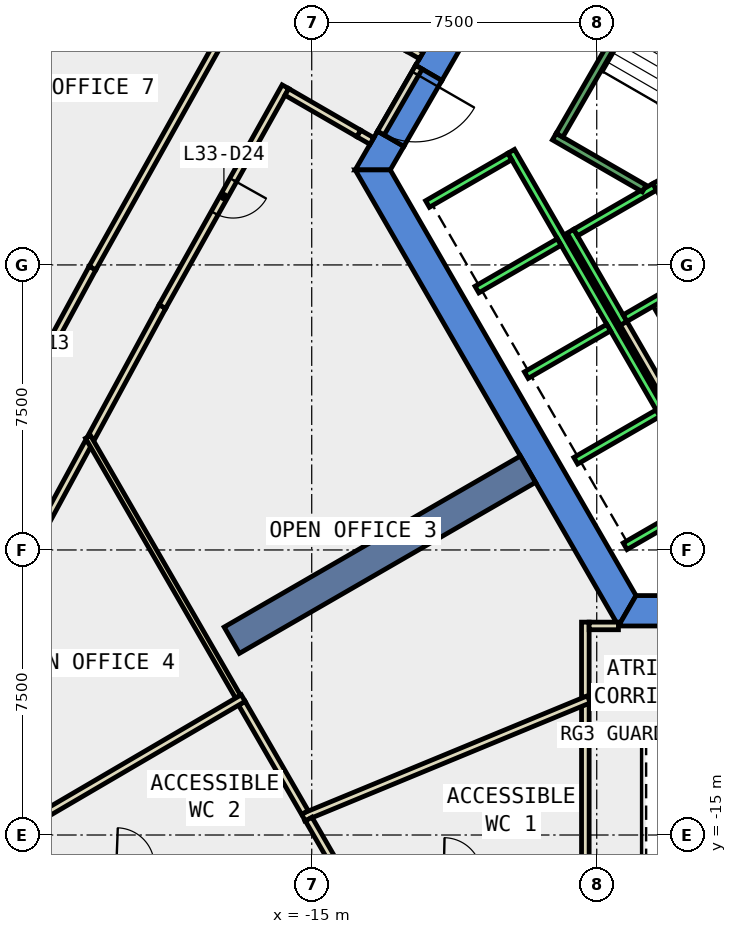
"""IFC4 building model, lengths in metres.
Left out: names, types, materials, properties, quantities, classifications, styles, units other than length and angle.
Written with IfcOpenShell. Run it as: python <this file> out.ifc"""

import sys

from ifc_helpers import new_model, si_unit, direction, frame, frame_2d, origin, place, context, subcontext, project, spatial, polyline, rectangle, outline, extrude, element, fill, save


model = new_model("IFC4")
c1 = context("Model", 3, precision=1e-05, world=origin(), true_north=direction((0.0, 1.0)))
c2 = subcontext(c1, "Body", "Model", "MODEL_VIEW")
j1 = project(units=[si_unit("LENGTHUNIT", "METRE"), si_unit("PLANEANGLEUNIT", "RADIAN")], contexts=[c1])
p1 = place(None, origin())
s1 = spatial("IfcSite", under=j1, at=p1, CompositionType="ELEMENT")
p2 = place(p1, origin())
s2 = spatial("IfcBuilding", under=s1, at=p2, CompositionType="ELEMENT")
p3 = place(p2, frame((0.0, 0.0, 150.8)))
s3 = spatial("IfcBuildingStorey", under=s2, at=p3, CompositionType="ELEMENT", Elevation=150.8)
p4 = place(p3, frame((0.0, 0.0, -0.4)))
e1 = element("IfcWall", 1, at=p4, inside=s3, PredefinedType="SHEAR", context=c2, shape_type="SweptSolid", body=[
    extrude(outline(polyline([(-12.267, 5.252), (-11.575, 4.852), (-6.466, 13.7), (-6.928, 14.5), (-12.267, 5.252)])), origin(), (0.0, 0.0, 1.0), 4.2),
])
p5 = place(p3, frame((0.0, 0.0, -0.4)))
e2 = element("IfcWall", 2, at=p5, inside=s3, PredefinedType="SHEAR", context=c2, shape_type="SweptSolid", body=[
    extrude(outline(polyline([(-12.575, 3.12), (-13.267, 3.52), (-13.856, 2.5), (-12.933, 2.5), (-12.575, 3.12)])), origin(), (0.0, 0.0, 1.0), 4.2),
])
p6 = place(p3, frame((0.0, 0.0, 3.6)))
e3 = element("IfcWall", 3, at=p6, inside=s3, PredefinedType="SHEAR", context=c2, shape_type="SweptSolid", body=[
    extrude(outline(polyline([(-13.267, 3.52), (-12.575, 3.12), (-11.575, 4.852), (-12.267, 5.252), (-13.267, 3.52)])), origin(), (0.0, 0.0, 1.0), 0.2),
])
p7 = place(p3, frame((0.0, 0.0, -0.4)))
e4 = element("IfcWall", 4, at=p7, inside=s3, PredefinedType="SHEAR", context=c2, shape_type="SweptSolid", body=[
    extrude(outline(polyline([(-13.856, 2.5), (-6.928, -9.5), (-6.466, -8.7), (-12.933, 2.5), (-13.856, 2.5)])), origin(), (0.0, 0.0, 1.0), 4.2),
])
p8 = place(p3, frame((0.0, 0.0, -0.4)))
e5 = element("IfcWall", 5, at=p8, inside=s3, PredefinedType="SHEAR", context=c2, shape_type="SweptSolid", body=[
    extrude(outline(polyline([(3.75, -9.5), (3.75, -8.7), (-6.466, -8.7), (-6.928, -9.5), (3.75, -9.5)])), origin(), (0.0, 0.0, 1.0), 4.2),
])
p9 = place(p3, frame((-9.31, -5.375, -0.4), z_axis=(0.0, 0.0, 1.0), x_axis=(-0.866017533419, -0.500013631625, 0.0)))
e6 = element("IfcWall", 6, at=p9, inside=s3, PredefinedType="SHEAR", context=c2, shape_type="SweptSolid", body=[
    extrude(rectangle(XDim=9.0, YDim=0.8, at=frame_2d((4.5, 0.0))), origin(), (0.0, 0.0, 1.0), 4.2),
])
p10 = place(p3, frame((-18.93, -1.095, 0.0), z_axis=(0.0, 0.0, 1.0), x_axis=(-0.476854303058, -0.878982351162, 0.0)))
e7 = element("IfcWall", 7, at=p10, inside=s3, PredefinedType="PARTITIONING", context=c2, shape_type="SweptSolid", body=[
    extrude(rectangle(XDim=3.924, YDim=0.2, at=frame_2d((1.962, 0.0))), origin(), (0.0, 0.0, 1.0), 3.8),
])
p11 = place(p3, frame((-13.417, 3.26, 0.0), z_axis=(0.0, 0.0, 1.0), x_axis=(-0.866398669086, 0.499352927503, 0.0)))
e8 = element("IfcWall", 8, at=p11, inside=s3, PredefinedType="PARTITIONING", context=c2, shape_type="SweptSolid", body=[
    extrude(rectangle(XDim=0.4, YDim=0.2, at=frame_2d((0.2, 0.0))), origin(), (0.0, 0.0, 1.0), 2.4),
])
p12 = place(p3, frame((-15.692, 4.689, 0.0), z_axis=(0.0, 0.0, 1.0), x_axis=(-0.48849233301, -0.872568186786, 0.0)))
e9 = element("IfcWall", 9, at=p12, inside=s3, PredefinedType="PARTITIONING", context=c2, shape_type="SweptSolid", body=[
    extrude(rectangle(XDim=6.629, YDim=0.2, at=frame_2d((3.314, 0.0))), origin(), (0.0, 0.0, 1.0), 3.8),
])
p13 = place(p12, frame((2.814, 0.0, 0.0)))
e10 = element("IfcOpeningElement", 10, at=p13, cuts=e9, PredefinedType="OPENING", context=c2, shape_type="SweptSolid", body=[
    extrude(rectangle(XDim=1.0, YDim=2.1, at=frame_2d((0.5, 1.05))), frame((0.0, 0.11, 0.0), z_axis=(0.0, -1.0, 0.0), x_axis=(1.0, 0.0, 0.0)), (0.0, 0.0, 1.0), 0.22),
])
p14 = place(p3, frame((-20.873, -4.676, 0.0), z_axis=(0.0, 0.0, 1.0), x_axis=(-0.476781985736, -0.879021579984, 0.0)))
e11 = element("IfcWall", 11, at=p14, inside=s3, PredefinedType="PARTITIONING", context=c2, shape_type="SweptSolid", body=[
    extrude(rectangle(XDim=2.869, YDim=0.2, at=frame_2d((1.435, 0.0))), origin(), (0.0, 0.0, 1.0), 3.8),
])
p15 = place(p3, frame((-24.13, -6.275, 0.0), z_axis=(0.0, 0.0, 1.0), x_axis=(0.476981750532, 0.878913198023, 0.0)))
e12 = element("IfcWall", 12, at=p15, inside=s3, PredefinedType="PARTITIONING", context=c2, shape_type="SweptSolid", body=[
    extrude(rectangle(XDim=7.046, YDim=0.2, at=frame_2d((3.523, 0.0))), origin(), (0.0, 0.0, 1.0), 3.8),
])
p16 = place(p15, frame((3.023, 0.0, 0.0)))
e13 = element("IfcOpeningElement", 13, at=p16, cuts=e12, PredefinedType="OPENING", context=c2, shape_type="SweptSolid", body=[
    extrude(rectangle(XDim=1.0, YDim=2.1, at=frame_2d((0.5, 1.05))), frame((0.0, 0.11, 0.0), z_axis=(0.0, -1.0, 0.0), x_axis=(1.0, 0.0, 0.0)), (0.0, 0.0, 1.0), 0.22),
])
p17 = place(p3, frame((-20.769, -0.082, 0.0), z_axis=(0.0, 0.0, 1.0), x_axis=(0.488387759141, 0.872626722443, 0.0)))
e14 = element("IfcWall", 14, at=p17, inside=s3, PredefinedType="PARTITIONING", context=c2, shape_type="SweptSolid", body=[
    extrude(rectangle(XDim=6.896, YDim=0.2, at=frame_2d((3.448, 0.0))), origin(), (0.0, 0.0, 1.0), 3.8),
])
p18 = place(p3, frame((-5.126, -2.422, 0.0), z_axis=(0.0, 0.0, 1.0), x_axis=(-0.500062241894, 0.865989465428, 0.0)))
e15 = element("IfcWall", 15, at=p18, inside=s3, PredefinedType="PARTITIONING", context=c2, shape_type="SweptSolid", body=[
    extrude(rectangle(XDim=1.7, YDim=0.2, at=frame_2d((0.85, 0.0))), origin(), (0.0, 0.0, 1.0), 3.8),
])
p19 = place(p3, frame((-5.492, -3.788, 0.0), z_axis=(0.0, 0.0, 1.0), x_axis=(-0.500008949224, 0.866020236886, 0.0)))
e16 = element("IfcWall", 16, at=p19, inside=s3, PredefinedType="PARTITIONING", context=c2, shape_type="SweptSolid", body=[
    extrude(rectangle(XDim=2.68, YDim=0.2, at=frame_2d((1.34, 0.0))), origin(), (0.0, 0.0, 1.0), 3.8),
])
p20 = place(p3, frame((-7.8, -11.368, 0.0), z_axis=(0.0, 0.0, 1.0), x_axis=(0.0, 1.0, 0.0)))
e17 = element("IfcWall", 17, at=p20, inside=s3, PredefinedType="PARTITIONING", context=c2, shape_type="SweptSolid", body=[
    extrude(rectangle(XDim=1.969, YDim=0.2, at=frame_2d((0.984, 0.0))), origin(), (0.0, 0.0, 1.0), 3.8),
])
p21 = place(p3, frame((-7.7, -9.499, 0.0), z_axis=(0.0, 0.0, 1.0), x_axis=(1.0, 0.0, 0.0)))
e18 = element("IfcWall", 18, at=p21, inside=s3, PredefinedType="PARTITIONING", context=c2, shape_type="SweptSolid", body=[
    extrude(rectangle(XDim=0.771, YDim=0.2, at=frame_2d((0.385, 0.0))), origin(), (0.0, 0.0, 1.0), 3.8),
])
p22 = place(p3, frame((-7.8, -16.055, 0.0), z_axis=(0.0, 0.0, 1.0), x_axis=(0.0, 1.0, 0.0)))
e19 = element("IfcWall", 19, at=p22, inside=s3, PredefinedType="PARTITIONING", context=c2, shape_type="SweptSolid", body=[
    extrude(rectangle(XDim=4.487, YDim=0.2, at=frame_2d((2.243, 0.0))), origin(), (0.0, 0.0, 1.0), 3.8),
])
p23 = place(p3, frame((-7.708, -11.43, 0.0), z_axis=(0.0, 0.0, 1.0), x_axis=(-0.924285151797, -0.381702709144, 0.0)))
e20 = element("IfcWall", 20, at=p23, inside=s3, PredefinedType="PARTITIONING", context=c2, shape_type="SweptSolid", body=[
    extrude(rectangle(XDim=8.129, YDim=0.2, at=frame_2d((4.065, 0.0))), origin(), (0.0, 0.0, 1.0), 3.8),
])
p24 = place(p3, frame((-16.939, -11.36, 0.0), z_axis=(0.0, 0.0, 1.0), x_axis=(-0.500053473428, 0.865994528685, 0.0)))
e21 = element("IfcWall", 21, at=p24, inside=s3, PredefinedType="PARTITIONING", context=c2, shape_type="SweptSolid", body=[
    extrude(rectangle(XDim=7.895, YDim=0.15, at=frame_2d((3.948, 0.0))), origin(), (0.0, 0.0, 1.0), 3.8),
])
p25 = place(p3, frame((-15.18, -14.408, 0.0), z_axis=(0.0, 0.0, 1.0), x_axis=(-0.499968694491, 0.866043477274, 0.0)))
e22 = element("IfcWall", 22, at=p25, inside=s3, PredefinedType="PARTITIONING", context=c2, shape_type="SweptSolid", body=[
    extrude(rectangle(XDim=3.319, YDim=0.2, at=frame_2d((1.659, 0.0))), origin(), (0.0, 0.0, 1.0), 3.8),
])
p26 = place(p3, frame((-14.256, -16.009, 0.0), z_axis=(0.0, 0.0, 1.0), x_axis=(-0.499786551025, 0.86614860354, 0.0)))
e23 = element("IfcWall", 23, at=p26, inside=s3, PredefinedType="PARTITIONING", context=c2, shape_type="SweptSolid", body=[
    extrude(rectangle(XDim=1.649, YDim=0.2, at=frame_2d((0.824, 0.0))), origin(), (0.0, 0.0, 1.0), 3.8),
])
p27 = place(p3, frame((-16.803, -11.397, 0.0), z_axis=(0.0, 0.0, 1.0), x_axis=(-0.863203941699, -0.504855380318, 0.0)))
e24 = element("IfcWall", 24, at=p27, inside=s3, PredefinedType="PARTITIONING", context=c2, shape_type="SweptSolid", body=[
    extrude(rectangle(XDim=8.232, YDim=0.2, at=frame_2d((4.116, 0.0))), origin(), (0.0, 0.0, 1.0), 3.8),
])
p28 = place(p3, frame((-12.18, 5.202, 0.0), z_axis=(0.0, 0.0, 1.0), x_axis=(-0.50002537861, -0.866010750942, 0.0)))
e25 = element("IfcWall", 25, at=p28, inside=s3, PredefinedType="PARTITIONING", context=c2, shape_type="SweptSolid", body=[
    extrude(rectangle(XDim=2.0, YDim=0.2, at=frame_2d((1.0, 0.0))), origin(), (0.0, 0.0, 1.0), 2.4),
])
p29 = place(p28, frame((0.19, 0.0, 0.0)))
e26 = element("IfcOpeningElement", 26, at=p29, cuts=e25, PredefinedType="OPENING", context=c2, shape_type="SweptSolid", body=[
    extrude(rectangle(XDim=1.8, YDim=2.1, at=frame_2d((0.9, 1.05))), frame((0.0, 0.11, 0.0), z_axis=(0.0, -1.0, 0.0), x_axis=(1.0, 0.0, 0.0)), (0.0, 0.0, 1.0), 0.22),
])
p30 = place(p3, frame((-12.463, 5.712, 0.0), z_axis=(0.0, 0.0, 1.0), x_axis=(0.865788603161, -0.500409926597, 0.0)))
e27 = element("IfcWall", 27, at=p30, inside=s3, PredefinedType="PARTITIONING", context=c2, shape_type="SweptSolid", body=[
    extrude(rectangle(XDim=0.4, YDim=0.2, at=frame_2d((0.2, 0.0))), origin(), (0.0, 0.0, 1.0), 2.4),
])
p31 = place(p3, frame((-13.764, 3.46, 0.0), z_axis=(0.0, 0.0, 1.0), x_axis=(-0.865872609263, 0.500264554538, 0.0)))
e28 = element("IfcWall", 28, at=p31, inside=s3, PredefinedType="PARTITIONING", context=c2, shape_type="SweptSolid", body=[
    extrude(rectangle(XDim=2.183, YDim=0.2, at=frame_2d((1.091, 0.0))), origin(), (0.0, 0.0, 1.0), 3.8),
])
p32 = place(p3, frame((-5.94, 2.188, 0.0), z_axis=(0.0, 0.0, 1.0), x_axis=(0.49994636267, -0.866056369097, 0.0)))
e29 = element("IfcWall", 29, at=p32, inside=s3, PredefinedType="STANDARD", context=c2, shape_type="SweptSolid", body=[
    extrude(rectangle(XDim=2.8, YDim=0.2, at=frame_2d((1.4, 0.0))), origin(), (0.0, 0.0, 1.0), 3.8),
])
p33 = place(p32, frame((1.225, 0.0, 0.0)))
e30 = element("IfcOpeningElement", 30, at=p33, cuts=e29, PredefinedType="OPENING", context=c2, shape_type="SweptSolid", body=[
    extrude(rectangle(XDim=1.1, YDim=2.1, at=frame_2d((0.55, 1.05))), frame((0.0, 0.11, 0.0), z_axis=(0.0, -1.0, 0.0), x_axis=(1.0, 0.0, 0.0)), (0.0, 0.0, 1.0), 0.22),
])
p34 = place(p3, frame((-8.192, 0.888, 0.0), z_axis=(0.0, 0.0, 1.0), x_axis=(0.49994636267, -0.866056369097, 0.0)))
e31 = element("IfcWall", 31, at=p34, inside=s3, PredefinedType="STANDARD", context=c2, shape_type="SweptSolid", body=[
    extrude(rectangle(XDim=2.8, YDim=0.2, at=frame_2d((1.4, 0.0))), origin(), (0.0, 0.0, 1.0), 3.8),
])
for number, where, z_axis, x_axis in (
    (32, (-5.977, 2.052, 0.0), (0.0, 0.0, 1.0), (-0.866, -0.5, 0.0)),
    (33, (-4.677, -0.2, 0.0), (0.0, 0.0, 1.0), (-0.866, -0.5, 0.0)),
):
    element("IfcWall", number, at=place(p3, frame(where, z_axis=z_axis, x_axis=x_axis)), inside=s3, PredefinedType="STANDARD", context=c2, shape_type="SweptSolid", body=[
        extrude(rectangle(XDim=2.399, YDim=0.2, at=frame_2d((1.2, 0.0))), origin(), (0.0, 0.0, 1.0), 3.8),
    ])
p35 = place(p3, frame((-9.751, 2.99, 0.0), z_axis=(0.0, 0.0, 1.0), x_axis=(0.50000090737, -0.866024879913, 0.0)))
e34 = element("IfcWall", 34, at=p35, inside=s3, PredefinedType="STANDARD", context=c2, shape_type="SweptSolid", body=[
    extrude(rectangle(XDim=10.6, YDim=0.2, at=frame_2d((5.3, 0.0))), origin(), (0.0, 0.0, 1.0), 3.8),
])
p36 = place(p3, frame((-9.788, 2.853, 0.0), z_axis=(0.0, 0.0, 1.0), x_axis=(-0.865998541277, -0.500046524342, 0.0)))
e35 = element("IfcWall", 35, at=p36, inside=s3, PredefinedType="STANDARD", context=c2, shape_type="SweptSolid", body=[
    extrude(rectangle(XDim=2.5, YDim=0.2, at=frame_2d((1.25, 0.0))), origin(), (0.0, 0.0, 1.0), 3.8),
])
for number, where, z_axis, x_axis in (
    (36, (-8.488, 0.602, 0.0), (0.0, 0.0, 1.0), (-0.866, -0.5, 0.0)),
    (37, (-7.188, -1.65, 0.0), (0.0, 0.0, 1.0), (-0.866, -0.5, 0.0)),
    (38, (-5.888, -3.902, 0.0), (0.0, 0.0, 1.0), (-0.866, -0.5, 0.0)),
    (39, (-4.588, -6.153, 0.0), (0.0, 0.0, 1.0), (-0.866, -0.5, 0.0)),
):
    element("IfcWall", number, at=place(p3, frame(where, z_axis=z_axis, x_axis=x_axis)), inside=s3, PredefinedType="STANDARD", context=c2, shape_type="SweptSolid", body=[
        extrude(rectangle(XDim=2.5, YDim=0.2, at=frame_2d((1.25, 0.0))), origin(), (0.0, 0.0, 1.0), 3.8),
    ])
p37 = place(p3, frame((-6.25, 2.01, 0.0), z_axis=(0.0, 0.0, 1.0), x_axis=(-0.86611865017, 0.499838457731, 0.0)))
e40 = element("IfcWall", 40, at=p37, inside=s3, PredefinedType="STANDARD", context=c2, shape_type="SweptSolid", body=[
    extrude(rectangle(XDim=2.733, YDim=0.2, at=frame_2d((1.366, 0.0))), origin(), (0.0, 0.0, 1.0), 3.8),
])
p38 = place(p3, frame((-5.03, 9.388, 0.0), z_axis=(0.0, 0.0, 1.0), x_axis=(-0.499978703459, -0.866037698999, 0.0)))
e41 = element("IfcWall", 41, at=p38, inside=s3, PredefinedType="STANDARD", context=c2, shape_type="SweptSolid", body=[
    extrude(rectangle(XDim=6.9, YDim=0.2, at=frame_2d((3.45, 0.0))), origin(), (0.0, 0.0, 1.0), 3.8),
])
p39 = place(p13, origin())
e42 = element("IfcDoor", 42, at=p39, inside=s3, OperationType="SINGLE_SWING_LEFT", PredefinedType="DOOR", context=c2, shape_type="SweptSolid", body=[
    extrude(rectangle(XDim=1.0, YDim=2.1, at=frame_2d((0.5, 1.05))), frame((0.0, 0.025, 0.0), z_axis=(0.0, -1.0, 0.0), x_axis=(1.0, 0.0, 0.0)), (0.0, 0.0, 1.0), 0.05),
])
fill(e10, e42)
p40 = place(p29, origin())
e43 = element("IfcDoor", 43, at=p40, inside=s3, OperationType="DOUBLE_DOOR_SINGLE_SWING", PredefinedType="DOOR", context=c2, shape_type="SweptSolid", body=[
    extrude(rectangle(XDim=1.8, YDim=2.1, at=frame_2d((0.9, 1.05))), frame((0.0, 0.025, 0.0), z_axis=(0.0, -1.0, 0.0), x_axis=(1.0, 0.0, 0.0)), (0.0, 0.0, 1.0), 0.05),
])
fill(e26, e43)
save(model, sys.argv[1])
